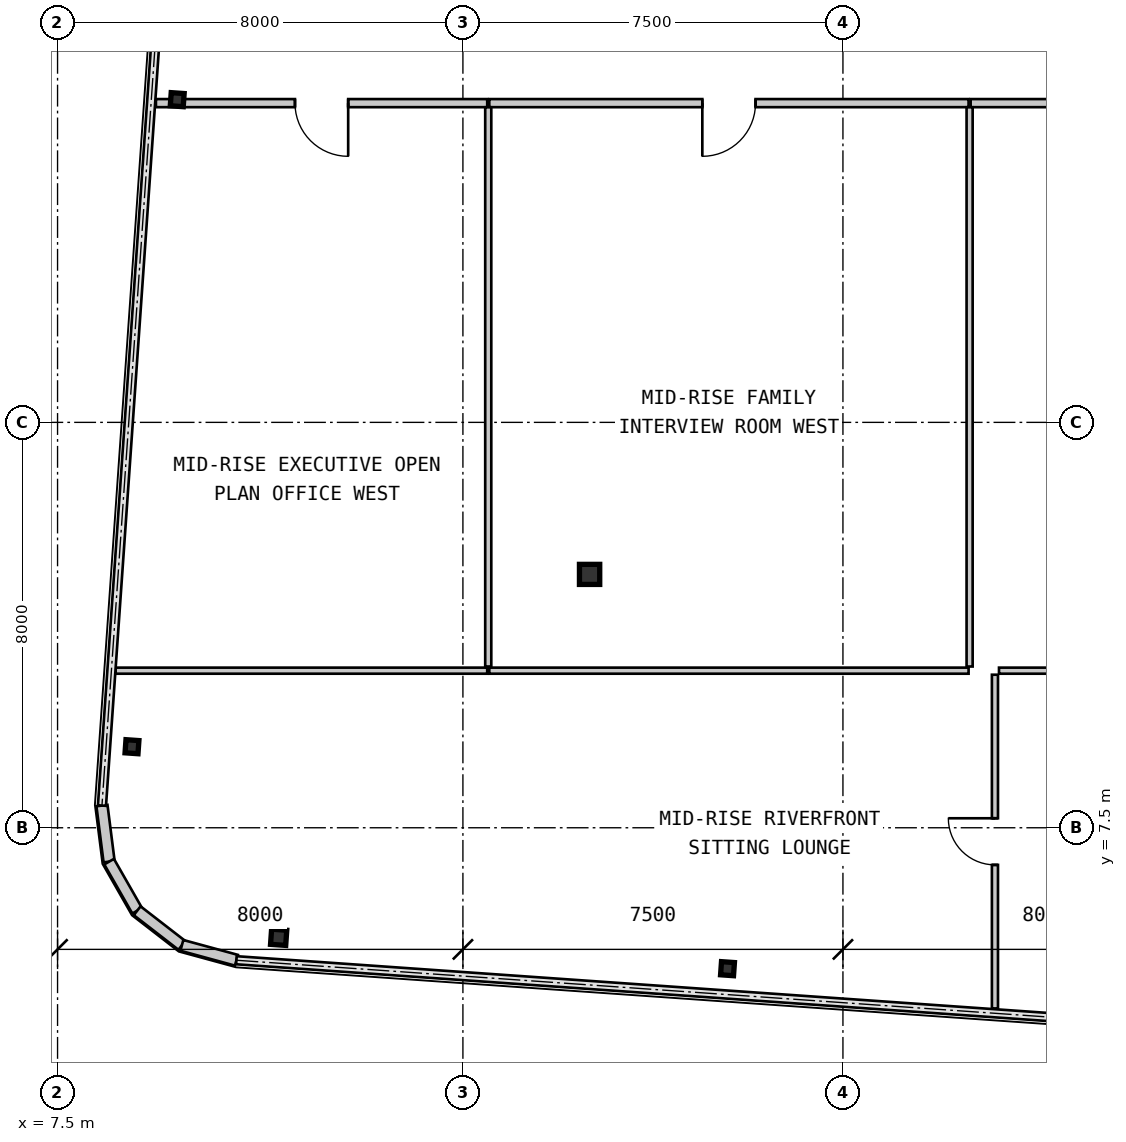
"""IFC4 building model, lengths in metres.
Left out: names, types, materials, properties, quantities, classifications, styles, units other than length and angle.
Written with IfcOpenShell. Run it as: python <this file> out.ifc"""

import sys

from ifc_helpers import new_model, si_unit, direction, frame, frame_2d, origin, origin_2d, place, context, subcontext, project, spatial, rectangle, hollow_rectangle, i_section, extrude, source, transform, mapped, element, fill, save


model = new_model("IFC4")
c1 = context("Model", 3, precision=1e-05, world=origin(), true_north=direction((0.0, 1.0)))
c2 = subcontext(c1, "Body", "Model", "MODEL_VIEW")
j1 = project(units=[si_unit("LENGTHUNIT", "METRE"), si_unit("PLANEANGLEUNIT", "RADIAN")], contexts=[c1])
p1 = place(None, origin())
s1 = spatial("IfcSite", under=j1, at=p1, CompositionType="ELEMENT")
p2 = place(p1, origin())
s2 = spatial("IfcBuilding", under=s1, at=p2, CompositionType="ELEMENT")
p3 = place(p2, frame((0.0, 0.0, 126.7)))
s3 = spatial("IfcBuildingStorey", under=s2, at=p3, CompositionType="ELEMENT", Elevation=126.7)
m1 = source(origin(), c2, "Body", "SweptSolid", [
    extrude(i_section(OverallWidth=0.4, OverallDepth=0.396, WebThickness=0.022, FlangeThickness=0.034, at=origin_2d()), origin(), (0.0, 0.0, 1.0), 3.15),
])
p4 = place(p3, frame((18.0, 12.5, 0.0), z_axis=(0.0, 0.0, 1.0), x_axis=(1.0, 0.0, 0.0)))
e1 = element("IfcColumn", 1, at=p4, inside=s3, PredefinedType="COLUMN", context=c2, shape_type="MappedRepresentation", body=[
    mapped(m1, transform((0.0, 0.0, 0.0), scale=1.0)),
])
m2 = source(origin(), c2, "Body", "SweptSolid", [
    extrude(hollow_rectangle(XDim=0.3, YDim=0.3, WallThickness=0.012, at=origin_2d()), origin(), (0.0, 0.0, 1.0), 3.15),
])
p5 = place(p3, frame((11.864, 5.338, 0.0), z_axis=(0.0, 0.0, 1.0), x_axis=(0.99756405026, -0.069756473744, 0.0)))
e2 = element("IfcColumn", 2, at=p5, inside=s3, PredefinedType="COLUMN", context=c2, shape_type="MappedRepresentation", body=[
    mapped(m2, transform((0.0, 0.0, 0.0), scale=1.0)),
])
m3 = source(origin(), c2, "Body", "SweptSolid", [
    extrude(i_section(OverallWidth=0.256, OverallDepth=0.26, WebThickness=0.01, FlangeThickness=0.017, at=origin_2d()), origin(), (0.0, 0.0, 1.0), 3.15),
])
for number, where, z_axis, x_axis in (
    (3, (20.722, 4.719, 0.0), (0.0, 0.0, 1.0), (0.998, -0.07, 0.0)),
    (4, (8.969, 9.1, 0.0), (0.0, 0.0, 1.0), (0.998, -0.07, 0.0)),
    (5, (9.862, 21.868, 0.0), (0.0, 0.0, 1.0), (0.998, -0.07, 0.0)),
):
    element("IfcColumn", number, at=place(p3, frame(where, z_axis=z_axis, x_axis=x_axis)), inside=s3, PredefinedType="COLUMN", context=c2, shape_type="MappedRepresentation", body=[
        mapped(m3, transform((0.0, 0.0, 0.0), scale=1.0)),
    ])
m4 = source(origin(), c2, "Body", "SweptSolid", [
    extrude(rectangle(XDim=1.116, YDim=0.22, at=frame_2d((0.558, 0.0))), origin(), (0.0, 0.0, 1.0), 2.93),
])
for number, where, z_axis, x_axis in (
    (6, (8.376, 7.938, 0.0), (0.0, 0.0, 1.0), (0.126, -0.992, 0.0)),
    (7, (8.517, 6.831, 0.0), (0.0, 0.0, 1.0), (0.496, -0.868, 0.0)),
    (8, (9.071, 5.862, 0.0), (0.0, 0.0, 1.0), (0.791, -0.612, 0.0)),
    (9, (9.953, 5.179, 0.0), (0.0, 0.0, 1.0), (0.965, -0.263, 0.0)),
):
    element("IfcWall", number, at=place(p3, frame(where, z_axis=z_axis, x_axis=x_axis)), inside=s3, PredefinedType="SOLIDWALL", context=c2, shape_type="MappedRepresentation", body=[
        mapped(m4, transform((0.0, 0.0, 0.0), scale=1.0)),
    ])
m5 = source(origin(), c2, "Body", "SweptSolid", [
    extrude(rectangle(XDim=6.538, YDim=0.16, at=frame_2d((3.269, 0.0))), origin(), (0.0, 0.0, 1.0), 2.93),
])
p6 = place(p3, frame((15.98, 21.8, 0.0), z_axis=(0.0, 0.0, 1.0), x_axis=(-1.0, 0.0, 0.0)))
e10 = element("IfcWall", 10, at=p6, inside=s3, PredefinedType="PARTITIONING", context=c2, shape_type="MappedRepresentation", body=[
    mapped(m5, transform((0.0, 0.0, 0.0), scale=1.0)),
])
m6 = source(origin(), c2, "Body", "SweptSolid", [
    extrude(rectangle(XDim=1.05, YDim=2.1, at=frame_2d((0.525, 1.05))), frame((0.0, 0.09, 0.0), z_axis=(0.0, -1.0, 0.0), x_axis=(1.0, 0.0, 0.0)), (0.0, 0.0, 1.0), 0.18),
])
p7 = place(p6, frame((2.744, 0.0, 0.0)))
e11 = element("IfcOpeningElement", 11, at=p7, cuts=e10, PredefinedType="OPENING", context=c2, shape_type="MappedRepresentation", body=[
    mapped(m6, transform((0.0, 0.0, 0.0), scale=1.0)),
])
m7 = source(origin(), c2, "Body", "SweptSolid", [
    extrude(rectangle(XDim=9.459, YDim=0.16, at=frame_2d((4.73, 0.0))), origin(), (0.0, 0.0, 1.0), 2.93),
])
p8 = place(p3, frame((25.48, 21.8, 0.0), z_axis=(0.0, 0.0, 1.0), x_axis=(-1.0, 0.0, 0.0)))
e12 = element("IfcWall", 12, at=p8, inside=s3, PredefinedType="PARTITIONING", context=c2, shape_type="MappedRepresentation", body=[
    mapped(m7, transform((0.0, 0.0, 0.0), scale=1.0)),
])
p9 = place(p8, frame((4.205, 0.0, 0.0)))
e13 = element("IfcOpeningElement", 13, at=p9, cuts=e12, PredefinedType="OPENING", context=c2, shape_type="MappedRepresentation", body=[
    mapped(m6, transform((0.0, 0.0, 0.0), scale=1.0)),
])
m8 = source(origin(), c2, "Body", "SweptSolid", [
    extrude(rectangle(XDim=8.26, YDim=0.16, at=frame_2d((4.13, 0.0))), origin(), (0.0, 0.0, 1.0), 2.93),
])
p10 = place(p3, frame((33.78, 21.8, 0.0), z_axis=(0.0, 0.0, 1.0), x_axis=(-1.0, 0.0, 0.0)))
e14 = element("IfcWall", 14, at=p10, inside=s3, PredefinedType="PARTITIONING", context=c2, shape_type="MappedRepresentation", body=[
    mapped(m8, transform((0.0, 0.0, 0.0), scale=1.0)),
])
m9 = source(origin(), c2, "Body", "SweptSolid", [
    extrude(rectangle(XDim=6.585, YDim=0.12, at=frame_2d((3.293, 0.0))), origin(), (0.0, 0.0, 1.0), 2.93),
])
p11 = place(p3, frame((26.0, 10.52, 0.0), z_axis=(0.0, 0.0, 1.0), x_axis=(0.0, -1.0, 0.0)))
e15 = element("IfcWall", 15, at=p11, inside=s3, PredefinedType="PARTITIONING", context=c2, shape_type="MappedRepresentation", body=[
    mapped(m9, transform((0.0, 0.0, 0.0), scale=1.0)),
])
m10 = source(origin(), c2, "Body", "SweptSolid", [
    extrude(rectangle(XDim=0.92, YDim=2.1, at=frame_2d((0.46, 1.05))), frame((0.0, 0.07, 0.0), z_axis=(0.0, -1.0, 0.0), x_axis=(1.0, 0.0, 0.0)), (0.0, 0.0, 1.0), 0.14),
])
p12 = place(p11, frame((2.833, 0.0, 0.0)))
e16 = element("IfcOpeningElement", 16, at=p12, cuts=e15, PredefinedType="OPENING", context=c2, shape_type="MappedRepresentation", body=[
    mapped(m10, transform((0.0, 0.0, 0.0), scale=1.0)),
])
m11 = source(origin(), c2, "Body", "SweptSolid", [
    extrude(rectangle(XDim=7.333, YDim=0.12, at=frame_2d((3.666, 0.0))), origin(), (0.0, 0.0, 1.0), 2.93),
])
p13 = place(p3, frame((8.647, 10.6, 0.0), z_axis=(0.0, 0.0, 1.0), x_axis=(1.0, 0.0, 0.0)))
e17 = element("IfcWall", 17, at=p13, inside=s3, PredefinedType="PARTITIONING", context=c2, shape_type="MappedRepresentation", body=[
    mapped(m11, transform((0.0, 0.0, 0.0), scale=1.0)),
])
m12 = source(origin(), c2, "Body", "SweptSolid", [
    extrude(rectangle(XDim=9.459, YDim=0.12, at=frame_2d((4.73, 0.0))), origin(), (0.0, 0.0, 1.0), 2.93),
])
p14 = place(p3, frame((16.02, 10.6, 0.0), z_axis=(0.0, 0.0, 1.0), x_axis=(1.0, 0.0, 0.0)))
e18 = element("IfcWall", 18, at=p14, inside=s3, PredefinedType="PARTITIONING", context=c2, shape_type="MappedRepresentation", body=[
    mapped(m12, transform((0.0, 0.0, 0.0), scale=1.0)),
])
m13 = source(origin(), c2, "Body", "SweptSolid", [
    extrude(rectangle(XDim=7.7, YDim=0.12, at=frame_2d((3.85, 0.0))), origin(), (0.0, 0.0, 1.0), 2.93),
])
p15 = place(p3, frame((26.08, 10.6, 0.0), z_axis=(0.0, 0.0, 1.0), x_axis=(1.0, 0.0, 0.0)))
e19 = element("IfcWall", 19, at=p15, inside=s3, PredefinedType="PARTITIONING", context=c2, shape_type="MappedRepresentation", body=[
    mapped(m13, transform((0.0, 0.0, 0.0), scale=1.0)),
])
m14 = source(origin(), c2, "Body", "SweptSolid", [
    extrude(rectangle(XDim=11.036, YDim=0.12, at=frame_2d((5.518, 0.0))), origin(), (0.0, 0.0, 1.0), 2.93),
])
for number, where, z_axis, x_axis in (
    (20, (16.0, 21.718, 0.0), (0.0, 0.0, 1.0), (0.0, -1.0, 0.0)),
    (21, (25.5, 21.718, 0.0), (0.0, 0.0, 1.0), (0.0, -1.0, 0.0)),
):
    element("IfcWall", number, at=place(p3, frame(where, z_axis=z_axis, x_axis=x_axis)), inside=s3, PredefinedType="PARTITIONING", context=c2, shape_type="MappedRepresentation", body=[
        mapped(m14, transform((0.0, 0.0, 0.0), scale=1.0)),
    ])
m15 = source(origin(), c2, "Body", "SweptSolid", [
    extrude(rectangle(XDim=1.05, YDim=2.1, at=frame_2d((0.525, 1.05))), frame((0.0, 0.025, 0.0), z_axis=(0.0, -1.0, 0.0), x_axis=(1.0, 0.0, 0.0)), (0.0, 0.0, 1.0), 0.05),
])
p16 = place(p7, origin())
e22 = element("IfcDoor", 22, at=p16, inside=s3, OperationType="SINGLE_SWING_LEFT", PredefinedType="DOOR", context=c2, shape_type="MappedRepresentation", body=[
    mapped(m15, transform((0.0, 0.0, 0.0), scale=1.0)),
])
fill(e11, e22)
p17 = place(p9, origin())
e23 = element("IfcDoor", 23, at=p17, inside=s3, OperationType="SINGLE_SWING_RIGHT", PredefinedType="DOOR", context=c2, shape_type="MappedRepresentation", body=[
    mapped(m15, transform((0.0, 0.0, 0.0), scale=1.0)),
])
fill(e13, e23)
m16 = source(origin(), c2, "Body", "SweptSolid", [
    extrude(rectangle(XDim=0.92, YDim=2.1, at=frame_2d((0.46, 1.05))), frame((0.0, 0.025, 0.0), z_axis=(0.0, -1.0, 0.0), x_axis=(1.0, 0.0, 0.0)), (0.0, 0.0, 1.0), 0.05),
])
p18 = place(p12, frame((0.92, 0.0, 0.0), z_axis=(0.0, 0.0, 1.0), x_axis=(-1.0, 0.0, 0.0)))
e24 = element("IfcDoor", 24, at=p18, inside=s3, OperationType="SINGLE_SWING_RIGHT", PredefinedType="DOOR", context=c2, shape_type="MappedRepresentation", body=[
    mapped(m16, transform((0.0, 0.0, 0.0), scale=1.0)),
])
fill(e16, e24)
save(model, sys.argv[1])
